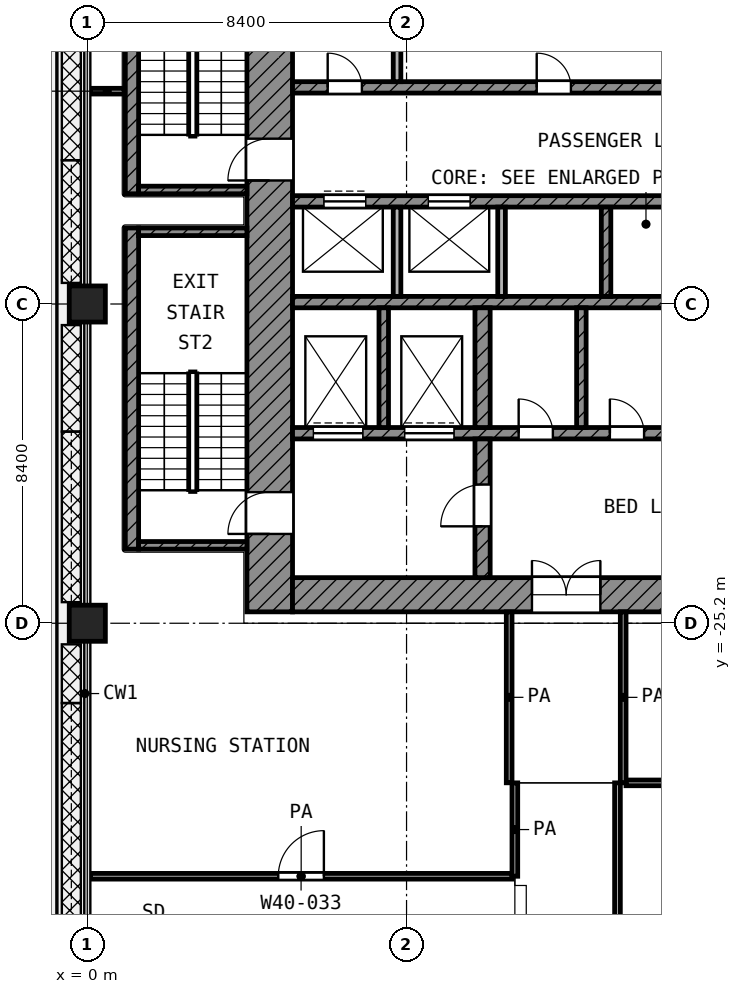
"""IFC4 building model, lengths in metres.
Left out: names, types, materials, properties, quantities, classifications, styles, units other than length and angle.
Written with IfcOpenShell. Run it as: python <this file> out.ifc"""

import sys

from ifc_helpers import new_model, si_unit, direction, frame, frame_2d, origin, origin_2d, place, context, subcontext, project, spatial, rectangle, extrude, element, fill, save


model = new_model("IFC4")
c1 = context("Model", 3, precision=1e-05, world=origin(), true_north=direction((0.0, 1.0)))
c2 = subcontext(c1, "Body", "Model", "MODEL_VIEW")
j1 = project(units=[si_unit("LENGTHUNIT", "METRE"), si_unit("PLANEANGLEUNIT", "RADIAN")], contexts=[c1])
p1 = place(None, origin())
s1 = spatial("IfcSite", under=j1, at=p1, CompositionType="ELEMENT")
p2 = place(p1, origin())
s2 = spatial("IfcBuilding", under=s1, at=p2, CompositionType="ELEMENT")
p3 = place(p2, frame((0.0, 0.0, 175.2)))
s3 = spatial("IfcBuildingStorey", under=s2, at=p3, CompositionType="ELEMENT", Elevation=175.2)
for number, where, z_axis, x_axis in (
    (1, (0.0, -16.8, 0.0), (0.0, 0.0, 1.0), (1.0, 0.0, 0.0)),
    (2, (0.0, -25.2, 0.0), (0.0, 0.0, 1.0), (1.0, 0.0, 0.0)),
):
    element("IfcColumn", number, at=place(p3, frame(where, z_axis=z_axis, x_axis=x_axis)), inside=s3, PredefinedType="COLUMN", context=c2, shape_type="SweptSolid", body=[
        extrude(rectangle(XDim=0.95, YDim=0.95, at=origin_2d()), origin(), (0.0, 0.0, 1.0), 4.2),
    ])
p4 = place(p3, frame((4.8, -24.9, 0.0), z_axis=(0.0, 0.0, 1.0), x_axis=(0.0, 1.0, 0.0)))
e3 = element("IfcWall", 3, at=p4, inside=s3, PredefinedType="SHEAR", context=c2, shape_type="SweptSolid", body=[
    extrude(rectangle(XDim=19.5, YDim=1.2, at=frame_2d((9.75, 0.0))), origin(), (0.0, 0.0, 1.0), 3.6),
])
p5 = place(p4, frame((11.35, 0.0, 0.0)))
e4 = element("IfcOpeningElement", 4, at=p5, cuts=e3, PredefinedType="OPENING", context=c2, shape_type="SweptSolid", body=[
    extrude(rectangle(XDim=1.1, YDim=2.1, at=frame_2d((0.55, 1.05))), frame((0.0, 0.61, 0.0), z_axis=(0.0, -1.0, 0.0), x_axis=(1.0, 0.0, 0.0)), (0.0, 0.0, 1.0), 1.22),
])
p6 = place(p4, frame((2.05, 0.0, 0.0)))
e5 = element("IfcOpeningElement", 5, at=p6, cuts=e3, PredefinedType="OPENING", context=c2, shape_type="SweptSolid", body=[
    extrude(rectangle(XDim=1.1, YDim=2.1, at=frame_2d((0.55, 1.05))), frame((0.0, 0.61, 0.0), z_axis=(0.0, -1.0, 0.0), x_axis=(1.0, 0.0, 0.0)), (0.0, 0.0, 1.0), 1.22),
])
p7 = place(p3, frame((5.4, -24.45, 0.0), z_axis=(0.0, 0.0, 1.0), x_axis=(1.0, 0.0, 0.0)))
e6 = element("IfcWall", 6, at=p7, inside=s3, PredefinedType="SHEAR", context=c2, shape_type="SweptSolid", body=[
    extrude(rectangle(XDim=18.6, YDim=0.9, at=frame_2d((9.3, 0.0))), origin(), (0.0, 0.0, 1.0), 3.6),
])
p8 = place(p7, frame((6.3, 0.0, 0.0)))
e7 = element("IfcOpeningElement", 7, at=p8, cuts=e6, PredefinedType="OPENING", context=c2, shape_type="SweptSolid", body=[
    extrude(rectangle(XDim=1.8, YDim=2.1, at=frame_2d((0.9, 1.05))), frame((0.0, 0.46, 0.0), z_axis=(0.0, -1.0, 0.0), x_axis=(1.0, 0.0, 0.0)), (0.0, 0.0, 1.0), 0.92),
])
p9 = place(p3, frame((5.4, -11.1, 0.0), z_axis=(0.0, 0.0, 1.0), x_axis=(1.0, 0.0, 0.0)))
e8 = element("IfcWall", 8, at=p9, inside=s3, PredefinedType="SHEAR", context=c2, shape_type="SweptSolid", body=[
    extrude(rectangle(XDim=16.65, YDim=0.3, at=frame_2d((8.325, 0.0))), origin(), (0.0, 0.0, 1.0), 3.6),
])
p10 = place(p9, frame((11.825, 0.0, 0.0)))
e9 = element("IfcOpeningElement", 9, at=p10, cuts=e8, PredefinedType="OPENING", context=c2, shape_type="SweptSolid", body=[
    extrude(rectangle(XDim=1.1, YDim=2.1, at=frame_2d((0.55, 1.05))), frame((0.0, 0.16, 0.0), z_axis=(0.0, -1.0, 0.0), x_axis=(1.0, 0.0, 0.0)), (0.0, 0.0, 1.0), 0.32),
])
p11 = place(p9, frame((14.575, 0.0, 0.0)))
e10 = element("IfcOpeningElement", 10, at=p11, cuts=e8, PredefinedType="OPENING", context=c2, shape_type="SweptSolid", body=[
    extrude(rectangle(XDim=1.1, YDim=2.1, at=frame_2d((0.55, 1.05))), frame((0.0, 0.16, 0.0), z_axis=(0.0, -1.0, 0.0), x_axis=(1.0, 0.0, 0.0)), (0.0, 0.0, 1.0), 0.32),
])
p12 = place(p9, frame((0.925, 0.0, 0.0)))
e11 = element("IfcOpeningElement", 11, at=p12, cuts=e8, PredefinedType="OPENING", context=c2, shape_type="SweptSolid", body=[
    extrude(rectangle(XDim=0.9, YDim=2.1, at=frame_2d((0.45, 1.05))), frame((0.0, 0.16, 0.0), z_axis=(0.0, -1.0, 0.0), x_axis=(1.0, 0.0, 0.0)), (0.0, 0.0, 1.0), 0.32),
])
p13 = place(p9, frame((6.425, 0.0, 0.0)))
e12 = element("IfcOpeningElement", 12, at=p13, cuts=e8, PredefinedType="OPENING", context=c2, shape_type="SweptSolid", body=[
    extrude(rectangle(XDim=0.9, YDim=2.1, at=frame_2d((0.45, 1.05))), frame((0.0, 0.16, 0.0), z_axis=(0.0, -1.0, 0.0), x_axis=(1.0, 0.0, 0.0)), (0.0, 0.0, 1.0), 0.32),
])
p14 = place(p3, frame((5.4, -14.1, 0.0), z_axis=(0.0, 0.0, 1.0), x_axis=(1.0, 0.0, 0.0)))
e13 = element("IfcWall", 13, at=p14, inside=s3, PredefinedType="SHEAR", context=c2, shape_type="SweptSolid", body=[
    extrude(rectangle(XDim=16.65, YDim=0.3, at=frame_2d((8.325, 0.0))), origin(), (0.0, 0.0, 1.0), 3.6),
])
p15 = place(p14, frame((0.825, 0.0, 0.0)))
e14 = element("IfcOpeningElement", 14, at=p15, cuts=e13, PredefinedType="OPENING", context=c2, shape_type="SweptSolid", body=[
    extrude(rectangle(XDim=1.1, YDim=2.1, at=frame_2d((0.55, 1.05))), frame((0.0, 0.16, 0.0), z_axis=(0.0, -1.0, 0.0), x_axis=(1.0, 0.0, 0.0)), (0.0, 0.0, 1.0), 0.32),
])
p16 = place(p14, frame((3.575, 0.0, 0.0)))
e15 = element("IfcOpeningElement", 15, at=p16, cuts=e13, PredefinedType="OPENING", context=c2, shape_type="SweptSolid", body=[
    extrude(rectangle(XDim=1.1, YDim=2.1, at=frame_2d((0.55, 1.05))), frame((0.0, 0.16, 0.0), z_axis=(0.0, -1.0, 0.0), x_axis=(1.0, 0.0, 0.0)), (0.0, 0.0, 1.0), 0.32),
])
p17 = place(p3, frame((5.4, -16.75, 0.0), z_axis=(0.0, 0.0, 1.0), x_axis=(1.0, 0.0, 0.0)))
e16 = element("IfcWall", 16, at=p17, inside=s3, PredefinedType="SHEAR", context=c2, shape_type="SweptSolid", body=[
    extrude(rectangle(XDim=16.65, YDim=0.3, at=frame_2d((8.325, 0.0))), origin(), (0.0, 0.0, 1.0), 3.6),
])
p18 = place(p3, frame((5.4, -20.2, 0.0), z_axis=(0.0, 0.0, 1.0), x_axis=(1.0, 0.0, 0.0)))
e17 = element("IfcWall", 17, at=p18, inside=s3, PredefinedType="SHEAR", context=c2, shape_type="SweptSolid", body=[
    extrude(rectangle(XDim=14.65, YDim=0.3, at=frame_2d((7.325, 0.0))), origin(), (0.0, 0.0, 1.0), 3.6),
])
p19 = place(p18, frame((10.55, 0.0, 0.0)))
e18 = element("IfcOpeningElement", 18, at=p19, cuts=e17, PredefinedType="OPENING", context=c2, shape_type="SweptSolid", body=[
    extrude(rectangle(XDim=1.3, YDim=2.1, at=frame_2d((0.65, 1.05))), frame((0.0, 0.16, 0.0), z_axis=(0.0, -1.0, 0.0), x_axis=(1.0, 0.0, 0.0)), (0.0, 0.0, 1.0), 0.32),
])
p20 = place(p18, frame((12.95, 0.0, 0.0)))
e19 = element("IfcOpeningElement", 19, at=p20, cuts=e17, PredefinedType="OPENING", context=c2, shape_type="SweptSolid", body=[
    extrude(rectangle(XDim=1.3, YDim=2.1, at=frame_2d((0.65, 1.05))), frame((0.0, 0.16, 0.0), z_axis=(0.0, -1.0, 0.0), x_axis=(1.0, 0.0, 0.0)), (0.0, 0.0, 1.0), 0.32),
])
p21 = place(p18, frame((0.55, 0.0, 0.0)))
e20 = element("IfcOpeningElement", 20, at=p21, cuts=e17, PredefinedType="OPENING", context=c2, shape_type="SweptSolid", body=[
    extrude(rectangle(XDim=1.3, YDim=2.1, at=frame_2d((0.65, 1.05))), frame((0.0, 0.16, 0.0), z_axis=(0.0, -1.0, 0.0), x_axis=(1.0, 0.0, 0.0)), (0.0, 0.0, 1.0), 0.32),
])
p22 = place(p18, frame((2.95, 0.0, 0.0)))
e21 = element("IfcOpeningElement", 21, at=p22, cuts=e17, PredefinedType="OPENING", context=c2, shape_type="SweptSolid", body=[
    extrude(rectangle(XDim=1.3, YDim=2.1, at=frame_2d((0.65, 1.05))), frame((0.0, 0.16, 0.0), z_axis=(0.0, -1.0, 0.0), x_axis=(1.0, 0.0, 0.0)), (0.0, 0.0, 1.0), 0.32),
])
p23 = place(p18, frame((5.95, 0.0, 0.0)))
e22 = element("IfcOpeningElement", 22, at=p23, cuts=e17, PredefinedType="OPENING", context=c2, shape_type="SweptSolid", body=[
    extrude(rectangle(XDim=0.9, YDim=2.1, at=frame_2d((0.45, 1.05))), frame((0.0, 0.16, 0.0), z_axis=(0.0, -1.0, 0.0), x_axis=(1.0, 0.0, 0.0)), (0.0, 0.0, 1.0), 0.32),
])
p24 = place(p18, frame((8.35, 0.0, 0.0)))
e23 = element("IfcOpeningElement", 23, at=p24, cuts=e17, PredefinedType="OPENING", context=c2, shape_type="SweptSolid", body=[
    extrude(rectangle(XDim=0.9, YDim=2.1, at=frame_2d((0.45, 1.05))), frame((0.0, 0.16, 0.0), z_axis=(0.0, -1.0, 0.0), x_axis=(1.0, 0.0, 0.0)), (0.0, 0.0, 1.0), 0.32),
])
p25 = place(p3, frame((10.4, -24.0, 0.0), z_axis=(0.0, 0.0, 1.0), x_axis=(0.0, 1.0, 0.0)))
e24 = element("IfcWall", 24, at=p25, inside=s3, PredefinedType="SHEAR", context=c2, shape_type="SweptSolid", body=[
    extrude(rectangle(XDim=3.65, YDim=0.4, at=frame_2d((1.825, 0.0))), origin(), (0.0, 0.0, 1.0), 3.6),
])
p26 = place(p25, frame((1.35, 0.0, 0.0)))
e25 = element("IfcOpeningElement", 25, at=p26, cuts=e24, PredefinedType="OPENING", context=c2, shape_type="SweptSolid", body=[
    extrude(rectangle(XDim=1.1, YDim=2.1, at=frame_2d((0.55, 1.05))), frame((0.0, 0.21, 0.0), z_axis=(0.0, -1.0, 0.0), x_axis=(1.0, 0.0, 0.0)), (0.0, 0.0, 1.0), 0.42),
])
p27 = place(p3, frame((10.4, -20.05, 0.0), z_axis=(0.0, 0.0, 1.0), x_axis=(0.0, 1.0, 0.0)))
e26 = element("IfcWall", 26, at=p27, inside=s3, PredefinedType="SHEAR", context=c2, shape_type="SweptSolid", body=[
    extrude(rectangle(XDim=3.15, YDim=0.4, at=frame_2d((1.575, 0.0))), origin(), (0.0, 0.0, 1.0), 3.6),
])
for number, where, z_axis, x_axis in (
    (27, (7.8, -20.05, 0.0), (0.0, 0.0, 1.0), (0.0, 1.0, 0.0)),
    (28, (13.0, -20.05, 0.0), (0.0, 0.0, 1.0), (0.0, 1.0, 0.0)),
):
    element("IfcWall", number, at=place(p3, frame(where, z_axis=z_axis, x_axis=x_axis)), inside=s3, PredefinedType="SHEAR", context=c2, shape_type="SweptSolid", body=[
        extrude(rectangle(XDim=3.15, YDim=0.25, at=frame_2d((1.575, 0.0))), origin(), (0.0, 0.0, 1.0), 3.6),
    ])
p28 = place(p3, frame((8.15, -10.95, 0.0), z_axis=(0.0, 0.0, 1.0), x_axis=(0.0, 1.0, 0.0)))
e29 = element("IfcWall", 29, at=p28, inside=s3, PredefinedType="PARTITIONING", context=c2, shape_type="SweptSolid", body=[
    extrude(rectangle(XDim=2.35, YDim=0.2, at=frame_2d((1.175, 0.0))), origin(), (0.0, 0.0, 1.0), 3.6),
])
for number, where, z_axis, x_axis in (
    (30, (8.15, -16.6, 0.0), (0.0, 0.0, 1.0), (0.0, 1.0, 0.0)),
    (31, (10.9, -16.6, 0.0), (0.0, 0.0, 1.0), (0.0, 1.0, 0.0)),
):
    element("IfcWall", number, at=place(p3, frame(where, z_axis=z_axis, x_axis=x_axis)), inside=s3, PredefinedType="PARTITIONING", context=c2, shape_type="SweptSolid", body=[
        extrude(rectangle(XDim=2.35, YDim=0.2, at=frame_2d((1.175, 0.0))), origin(), (0.0, 0.0, 1.0), 3.6),
    ])
p29 = place(p3, frame((13.65, -16.6, 0.0), z_axis=(0.0, 0.0, 1.0), x_axis=(0.0, 1.0, 0.0)))
e32 = element("IfcWall", 32, at=p29, inside=s3, PredefinedType="SHEAR", context=c2, shape_type="SweptSolid", body=[
    extrude(rectangle(XDim=2.35, YDim=0.25, at=frame_2d((1.175, 0.0))), origin(), (0.0, 0.0, 1.0), 3.6),
])
p30 = place(p3, frame((1.175, -13.9, 0.0), z_axis=(0.0, 0.0, 1.0), x_axis=(0.0, 1.0, 0.0)))
e33 = element("IfcWall", 33, at=p30, inside=s3, PredefinedType="SHEAR", context=c2, shape_type="SweptSolid", body=[
    extrude(rectangle(XDim=8.45, YDim=0.35, at=frame_2d((4.225, 0.0))), origin(), (0.0, 0.0, 1.0), 3.6),
])
p31 = place(p3, frame((1.35, -13.8, 0.0), z_axis=(0.0, 0.0, 1.0), x_axis=(1.0, 0.0, 0.0)))
e34 = element("IfcWall", 34, at=p31, inside=s3, PredefinedType="SHEAR", context=c2, shape_type="SweptSolid", body=[
    extrude(rectangle(XDim=2.85, YDim=0.2, at=frame_2d((1.425, 0.0))), origin(), (0.0, 0.0, 1.0), 3.6),
])
p32 = place(p3, frame((1.175, -23.25, 0.0), z_axis=(0.0, 0.0, 1.0), x_axis=(0.0, 1.0, 0.0)))
e35 = element("IfcWall", 35, at=p32, inside=s3, PredefinedType="SHEAR", context=c2, shape_type="SweptSolid", body=[
    extrude(rectangle(XDim=8.45, YDim=0.35, at=frame_2d((4.225, 0.0))), origin(), (0.0, 0.0, 1.0), 3.6),
])
for number, where, z_axis, x_axis in (
    (36, (1.35, -14.9, 0.0), (0.0, 0.0, 1.0), (1.0, 0.0, 0.0)),
    (37, (1.35, -23.15, 0.0), (0.0, 0.0, 1.0), (1.0, 0.0, 0.0)),
):
    element("IfcWall", number, at=place(p3, frame(where, z_axis=z_axis, x_axis=x_axis)), inside=s3, PredefinedType="SHEAR", context=c2, shape_type="SweptSolid", body=[
        extrude(rectangle(XDim=2.85, YDim=0.2, at=frame_2d((1.425, 0.0))), origin(), (0.0, 0.0, 1.0), 3.6),
    ])
p33 = place(p3, frame((0.08, -31.857, 0.0), z_axis=(0.0, 0.0, 1.0), x_axis=(1.0, 0.0, 0.0)))
e38 = element("IfcWall", 38, at=p33, inside=s3, PredefinedType="PARTITIONING", context=c2, shape_type="SweptSolid", body=[
    extrude(rectangle(XDim=11.095, YDim=0.15, at=frame_2d((5.547, 0.0))), origin(), (0.0, 0.0, 1.0), 3.6),
])
p34 = place(p33, frame((4.945, 0.0, 0.0)))
e39 = element("IfcOpeningElement", 39, at=p34, cuts=e38, PredefinedType="OPENING", context=c2, shape_type="SweptSolid", body=[
    extrude(rectangle(XDim=1.2, YDim=2.1, at=frame_2d((0.6, 1.05))), frame((0.0, 0.085, 0.0), z_axis=(0.0, -1.0, 0.0), x_axis=(1.0, 0.0, 0.0)), (0.0, 0.0, 1.0), 0.17),
])
p35 = place(p3, frame((14.175, -29.4, 0.0), z_axis=(0.0, 0.0, 1.0), x_axis=(1.0, 0.0, 0.0)))
e40 = element("IfcWall", 40, at=p35, inside=s3, PredefinedType="PARTITIONING", context=c2, shape_type="SweptSolid", body=[
    extrude(rectangle(XDim=15.15, YDim=0.15, at=frame_2d((7.575, 0.0))), origin(), (0.0, 0.0, 1.0), 3.6),
])
p36 = place(p3, frame((0.08, -11.2, 0.0), z_axis=(0.0, 0.0, 1.0), x_axis=(1.0, 0.0, 0.0)))
e41 = element("IfcWall", 41, at=p36, inside=s3, PredefinedType="PARTITIONING", context=c2, shape_type="SweptSolid", body=[
    extrude(rectangle(XDim=0.89, YDim=0.15, at=frame_2d((0.445, 0.0))), origin(), (0.0, 0.0, 1.0), 3.6),
])
p37 = place(p3, frame((11.1, -29.398, 0.0), z_axis=(0.0, 0.0, 1.0), x_axis=(0.0, 1.0, 0.0)))
e42 = element("IfcWall", 42, at=p37, inside=s3, PredefinedType="PARTITIONING", context=c2, shape_type="SweptSolid", body=[
    extrude(rectangle(XDim=4.498, YDim=0.15, at=frame_2d((2.249, 0.0))), origin(), (0.0, 0.0, 1.0), 3.6),
])
p38 = place(p3, frame((11.25, -31.857, 0.0), z_axis=(0.0, 0.0, 1.0), x_axis=(0.0, 1.0, 0.0)))
e43 = element("IfcWall", 43, at=p38, inside=s3, PredefinedType="PARTITIONING", context=c2, shape_type="SweptSolid", body=[
    extrude(rectangle(XDim=2.457, YDim=0.15, at=frame_2d((1.229, 0.0))), origin(), (0.0, 0.0, 1.0), 3.6),
])
p39 = place(p3, frame((13.95, -54.52, 0.0), z_axis=(0.0, 0.0, 1.0), x_axis=(0.0, 1.0, 0.0)))
e44 = element("IfcWall", 44, at=p39, inside=s3, PredefinedType="PARTITIONING", context=c2, shape_type="SweptSolid", body=[
    extrude(rectangle(XDim=25.12, YDim=0.15, at=frame_2d((12.56, 0.0))), origin(), (0.0, 0.0, 1.0), 3.6),
])
p40 = place(p39, frame((20.17, 0.0, 0.0)))
e45 = element("IfcOpeningElement", 45, at=p40, cuts=e44, PredefinedType="OPENING", context=c2, shape_type="SweptSolid", body=[
    extrude(rectangle(XDim=1.2, YDim=2.1, at=frame_2d((0.6, 1.05))), frame((0.0, 0.085, 0.0), z_axis=(0.0, -1.0, 0.0), x_axis=(1.0, 0.0, 0.0)), (0.0, 0.0, 1.0), 0.17),
])
p41 = place(p39, frame((13.97, 0.0, 0.0)))
e46 = element("IfcOpeningElement", 46, at=p41, cuts=e44, PredefinedType="OPENING", context=c2, shape_type="SweptSolid", body=[
    extrude(rectangle(XDim=1.0, YDim=2.1, at=frame_2d((0.5, 1.05))), frame((0.0, 0.085, 0.0), z_axis=(0.0, -1.0, 0.0), x_axis=(1.0, 0.0, 0.0)), (0.0, 0.0, 1.0), 0.17),
])
p42 = place(p39, frame((11.22, 0.0, 0.0)))
e47 = element("IfcOpeningElement", 47, at=p42, cuts=e44, PredefinedType="OPENING", context=c2, shape_type="SweptSolid", body=[
    extrude(rectangle(XDim=1.1, YDim=2.1, at=frame_2d((0.55, 1.05))), frame((0.0, 0.085, 0.0), z_axis=(0.0, -1.0, 0.0), x_axis=(1.0, 0.0, 0.0)), (0.0, 0.0, 1.0), 0.17),
])
p43 = place(p39, frame((3.67, 0.0, 0.0)))
e48 = element("IfcOpeningElement", 48, at=p43, cuts=e44, PredefinedType="OPENING", context=c2, shape_type="SweptSolid", body=[
    extrude(rectangle(XDim=1.5, YDim=2.1, at=frame_2d((0.75, 1.05))), frame((0.0, 0.085, 0.0), z_axis=(0.0, -1.0, 0.0), x_axis=(1.0, 0.0, 0.0)), (0.0, 0.0, 1.0), 0.17),
])
p44 = place(p3, frame((14.1, -29.4, 0.0), z_axis=(0.0, 0.0, 1.0), x_axis=(0.0, 1.0, 0.0)))
e49 = element("IfcWall", 49, at=p44, inside=s3, PredefinedType="PARTITIONING", context=c2, shape_type="SweptSolid", body=[
    extrude(rectangle(XDim=4.5, YDim=0.15, at=frame_2d((2.25, 0.0))), origin(), (0.0, 0.0, 1.0), 3.6),
])
p45 = place(p15, origin())
e50 = element("IfcDoor", 50, at=p45, inside=s3, OperationType="DOUBLE_DOOR_SLIDING", PredefinedType="DOOR", context=c2, shape_type="SweptSolid", body=[
    extrude(rectangle(XDim=1.1, YDim=2.1, at=frame_2d((0.55, 1.05))), frame((0.0, 0.025, 0.0), z_axis=(0.0, -1.0, 0.0), x_axis=(1.0, 0.0, 0.0)), (0.0, 0.0, 1.0), 0.05),
])
fill(e14, e50)
p46 = place(p16, origin())
e51 = element("IfcDoor", 51, at=p46, inside=s3, OperationType="DOUBLE_DOOR_SLIDING", PredefinedType="DOOR", context=c2, shape_type="SweptSolid", body=[
    extrude(rectangle(XDim=1.1, YDim=2.1, at=frame_2d((0.55, 1.05))), frame((0.0, 0.025, 0.0), z_axis=(0.0, -1.0, 0.0), x_axis=(1.0, 0.0, 0.0)), (0.0, 0.0, 1.0), 0.05),
])
fill(e15, e51)
p47 = place(p21, origin())
e52 = element("IfcDoor", 52, at=p47, inside=s3, OperationType="DOUBLE_DOOR_SLIDING", PredefinedType="DOOR", context=c2, shape_type="SweptSolid", body=[
    extrude(rectangle(XDim=1.3, YDim=2.1, at=frame_2d((0.65, 1.05))), frame((0.0, 0.025, 0.0), z_axis=(0.0, -1.0, 0.0), x_axis=(1.0, 0.0, 0.0)), (0.0, 0.0, 1.0), 0.05),
])
fill(e20, e52)
p48 = place(p22, origin())
e53 = element("IfcDoor", 53, at=p48, inside=s3, OperationType="DOUBLE_DOOR_SLIDING", PredefinedType="DOOR", context=c2, shape_type="SweptSolid", body=[
    extrude(rectangle(XDim=1.3, YDim=2.1, at=frame_2d((0.65, 1.05))), frame((0.0, 0.025, 0.0), z_axis=(0.0, -1.0, 0.0), x_axis=(1.0, 0.0, 0.0)), (0.0, 0.0, 1.0), 0.05),
])
fill(e21, e53)
p49 = place(p5, origin())
e54 = element("IfcDoor", 54, at=p49, inside=s3, OperationType="SINGLE_SWING_LEFT", PredefinedType="DOOR", context=c2, shape_type="SweptSolid", body=[
    extrude(rectangle(XDim=1.1, YDim=2.1, at=frame_2d((0.55, 1.05))), frame((0.0, 0.025, 0.0), z_axis=(0.0, -1.0, 0.0), x_axis=(1.0, 0.0, 0.0)), (0.0, 0.0, 1.0), 0.05),
])
fill(e4, e54)
p50 = place(p6, origin())
e55 = element("IfcDoor", 55, at=p50, inside=s3, OperationType="SINGLE_SWING_LEFT", PredefinedType="DOOR", context=c2, shape_type="SweptSolid", body=[
    extrude(rectangle(XDim=1.1, YDim=2.1, at=frame_2d((0.55, 1.05))), frame((0.0, 0.025, 0.0), z_axis=(0.0, -1.0, 0.0), x_axis=(1.0, 0.0, 0.0)), (0.0, 0.0, 1.0), 0.05),
])
fill(e5, e55)
p51 = place(p26, origin())
e56 = element("IfcDoor", 56, at=p51, inside=s3, OperationType="SINGLE_SWING_LEFT", PredefinedType="DOOR", context=c2, shape_type="SweptSolid", body=[
    extrude(rectangle(XDim=1.1, YDim=2.1, at=frame_2d((0.55, 1.05))), frame((0.0, 0.025, 0.0), z_axis=(0.0, -1.0, 0.0), x_axis=(1.0, 0.0, 0.0)), (0.0, 0.0, 1.0), 0.05),
])
fill(e25, e56)
p52 = place(p8, origin())
e57 = element("IfcDoor", 57, at=p52, inside=s3, OperationType="DOUBLE_DOOR_SINGLE_SWING", PredefinedType="DOOR", context=c2, shape_type="SweptSolid", body=[
    extrude(rectangle(XDim=1.8, YDim=2.1, at=frame_2d((0.9, 1.05))), frame((0.0, 0.025, 0.0), z_axis=(0.0, -1.0, 0.0), x_axis=(1.0, 0.0, 0.0)), (0.0, 0.0, 1.0), 0.05),
])
fill(e7, e57)
p53 = place(p23, origin())
e58 = element("IfcDoor", 58, at=p53, inside=s3, OperationType="SINGLE_SWING_LEFT", PredefinedType="DOOR", context=c2, shape_type="SweptSolid", body=[
    extrude(rectangle(XDim=0.9, YDim=2.1, at=frame_2d((0.45, 1.05))), frame((0.0, 0.025, 0.0), z_axis=(0.0, -1.0, 0.0), x_axis=(1.0, 0.0, 0.0)), (0.0, 0.0, 1.0), 0.05),
])
fill(e22, e58)
p54 = place(p24, origin())
e59 = element("IfcDoor", 59, at=p54, inside=s3, OperationType="SINGLE_SWING_LEFT", PredefinedType="DOOR", context=c2, shape_type="SweptSolid", body=[
    extrude(rectangle(XDim=0.9, YDim=2.1, at=frame_2d((0.45, 1.05))), frame((0.0, 0.025, 0.0), z_axis=(0.0, -1.0, 0.0), x_axis=(1.0, 0.0, 0.0)), (0.0, 0.0, 1.0), 0.05),
])
fill(e23, e59)
p55 = place(p12, origin())
e60 = element("IfcDoor", 60, at=p55, inside=s3, OperationType="SINGLE_SWING_LEFT", PredefinedType="DOOR", context=c2, shape_type="SweptSolid", body=[
    extrude(rectangle(XDim=0.9, YDim=2.1, at=frame_2d((0.45, 1.05))), frame((0.0, 0.025, 0.0), z_axis=(0.0, -1.0, 0.0), x_axis=(1.0, 0.0, 0.0)), (0.0, 0.0, 1.0), 0.05),
])
fill(e11, e60)
p56 = place(p13, origin())
e61 = element("IfcDoor", 61, at=p56, inside=s3, OperationType="SINGLE_SWING_LEFT", PredefinedType="DOOR", context=c2, shape_type="SweptSolid", body=[
    extrude(rectangle(XDim=0.9, YDim=2.1, at=frame_2d((0.45, 1.05))), frame((0.0, 0.025, 0.0), z_axis=(0.0, -1.0, 0.0), x_axis=(1.0, 0.0, 0.0)), (0.0, 0.0, 1.0), 0.05),
])
fill(e12, e61)
p57 = place(p34, origin())
e62 = element("IfcDoor", 62, at=p57, inside=s3, OperationType="SINGLE_SWING_RIGHT", PredefinedType="DOOR", context=c2, shape_type="SweptSolid", body=[
    extrude(rectangle(XDim=1.2, YDim=2.1, at=frame_2d((0.6, 1.05))), frame((0.0, 0.025, 0.0), z_axis=(0.0, -1.0, 0.0), x_axis=(1.0, 0.0, 0.0)), (0.0, 0.0, 1.0), 0.05),
])
fill(e39, e62)
save(model, sys.argv[1])
